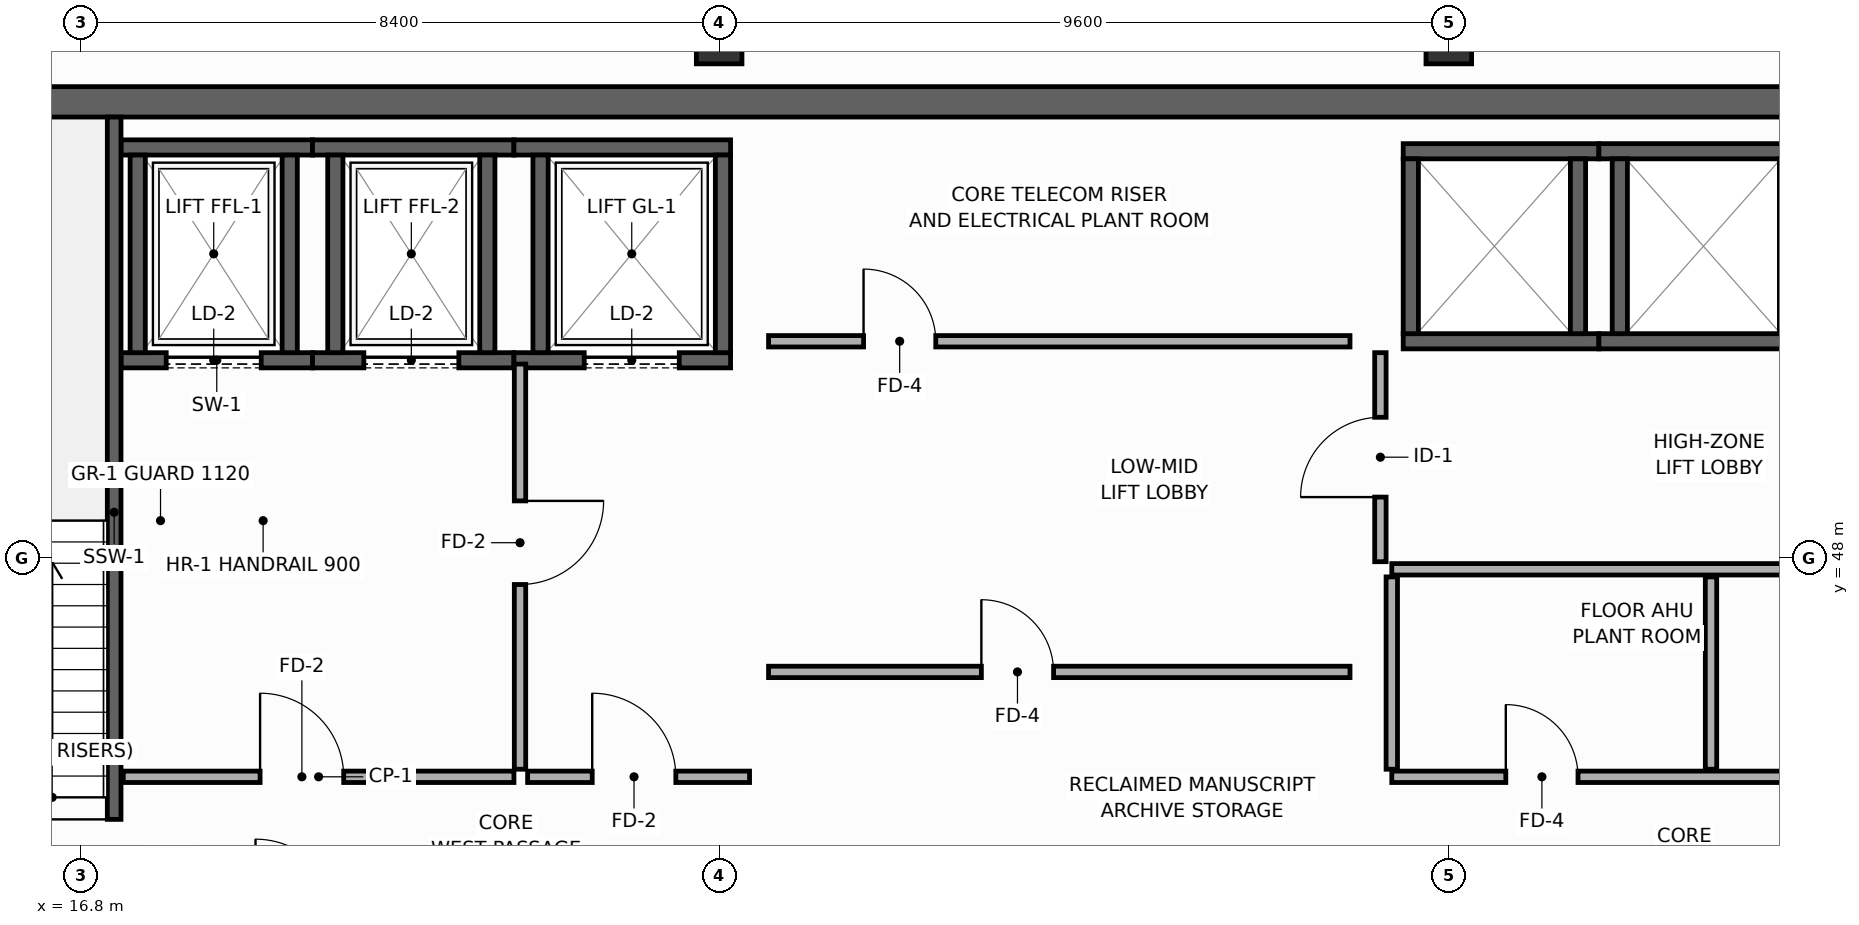
"""IFC4 building model, lengths in metres.
Left out: names, types, materials, properties, quantities, classifications, styles, units other than length and angle.
Written with IfcOpenShell. Run it as: python <this file> out.ifc"""

import sys

from ifc_helpers import new_model, si_unit, direction, frame, frame_2d, origin, origin_2d, place, context, subcontext, project, spatial, rectangle, hollow_rectangle, extrude, element, fill, save


model = new_model("IFC4")
c1 = context("Model", 3, precision=1e-05, world=origin(), true_north=direction((0.0, 1.0)))
c2 = subcontext(c1, "Body", "Model", "MODEL_VIEW")
j1 = project(units=[si_unit("LENGTHUNIT", "METRE"), si_unit("PLANEANGLEUNIT", "RADIAN")], contexts=[c1])
p1 = place(None, origin())
s1 = spatial("IfcSite", under=j1, at=p1, CompositionType="ELEMENT")
p2 = place(p1, origin())
s2 = spatial("IfcBuilding", under=s1, at=p2, CompositionType="ELEMENT")
p3 = place(p2, frame((0.0, 0.0, 314.2)))
s3 = spatial("IfcBuildingStorey", under=s2, at=p3, CompositionType="ELEMENT", Elevation=314.2)
p4 = place(p3, frame((13.7, 54.0, 0.0), z_axis=(0.0, 0.0, 1.0), x_axis=(1.0, 0.0, 0.0)))
e1 = element("IfcWall", 1, at=p4, inside=s3, PredefinedType="SHEAR", context=c2, shape_type="SweptSolid", body=[
    extrude(rectangle(XDim=32.5, YDim=0.4, at=frame_2d((16.25, 0.0))), origin(), (0.0, 0.0, 1.0), 4.75),
])
for number, where, z_axis, x_axis in (
    (2, (25.2, 54.8, 0.0), (0.0, 0.0, 1.0), (1.0, 0.0, 0.0)),
    (3, (34.8, 54.8, 0.0), (0.0, 0.0, 1.0), (1.0, 0.0, 0.0)),
):
    element("IfcColumn", number, at=place(p3, frame(where, z_axis=z_axis, x_axis=x_axis)), inside=s3, PredefinedType="COLUMN", context=c2, shape_type="SweptSolid", body=[
        extrude(hollow_rectangle(XDim=0.6, YDim=0.6, WallThickness=0.028, at=origin_2d()), origin(), (0.0, 0.0, 1.0), 5.0),
    ])
p5 = place(p3, frame((17.33, 50.6, 0.0), z_axis=(0.0, 0.0, 1.0), x_axis=(1.0, 0.0, 0.0)))
e4 = element("IfcWall", 4, at=p5, inside=s3, PredefinedType="SHEAR", context=c2, shape_type="SweptSolid", body=[
    extrude(rectangle(XDim=2.52, YDim=0.2, at=frame_2d((1.26, 0.0))), origin(), (0.0, 0.0, 1.0), 4.75),
])
p6 = place(p5, frame((0.595, 0.0, 0.0)))
e5 = element("IfcOpeningElement", 5, at=p6, cuts=e4, PredefinedType="OPENING", context=c2, shape_type="SweptSolid", body=[
    extrude(rectangle(XDim=1.25, YDim=2.3, at=frame_2d((0.625, 1.15))), frame((0.0, 0.11, 0.0), z_axis=(0.0, -1.0, 0.0), x_axis=(1.0, 0.0, 0.0)), (0.0, 0.0, 1.0), 0.22),
])
p7 = place(p3, frame((17.33, 53.4, 0.0), z_axis=(0.0, 0.0, 1.0), x_axis=(1.0, 0.0, 0.0)))
e6 = element("IfcWall", 6, at=p7, inside=s3, PredefinedType="SHEAR", context=c2, shape_type="SweptSolid", body=[
    extrude(rectangle(XDim=2.52, YDim=0.2, at=frame_2d((1.26, 0.0))), origin(), (0.0, 0.0, 1.0), 4.75),
])
for number, where, z_axis, x_axis in (
    (7, (17.55, 50.7, 0.0), (0.0, 0.0, 1.0), (0.0, 1.0, 0.0)),
    (8, (19.55, 50.7, 0.0), (0.0, 0.0, 1.0), (0.0, 1.0, 0.0)),
):
    element("IfcWall", number, at=place(p3, frame(where, z_axis=z_axis, x_axis=x_axis)), inside=s3, PredefinedType="SHEAR", context=c2, shape_type="SweptSolid", body=[
        extrude(rectangle(XDim=2.6, YDim=0.2, at=frame_2d((1.3, 0.0))), origin(), (0.0, 0.0, 1.0), 4.75),
    ])
p8 = place(p3, frame((19.85, 50.6, 0.0), z_axis=(0.0, 0.0, 1.0), x_axis=(1.0, 0.0, 0.0)))
e9 = element("IfcWall", 9, at=p8, inside=s3, PredefinedType="SHEAR", context=c2, shape_type="SweptSolid", body=[
    extrude(rectangle(XDim=2.65, YDim=0.2, at=frame_2d((1.325, 0.0))), origin(), (0.0, 0.0, 1.0), 4.75),
])
p9 = place(p8, frame((0.675, 0.0, 0.0)))
e10 = element("IfcOpeningElement", 10, at=p9, cuts=e9, PredefinedType="OPENING", context=c2, shape_type="SweptSolid", body=[
    extrude(rectangle(XDim=1.25, YDim=2.3, at=frame_2d((0.625, 1.15))), frame((0.0, 0.11, 0.0), z_axis=(0.0, -1.0, 0.0), x_axis=(1.0, 0.0, 0.0)), (0.0, 0.0, 1.0), 0.22),
])
p10 = place(p3, frame((19.85, 53.4, 0.0), z_axis=(0.0, 0.0, 1.0), x_axis=(1.0, 0.0, 0.0)))
e11 = element("IfcWall", 11, at=p10, inside=s3, PredefinedType="SHEAR", context=c2, shape_type="SweptSolid", body=[
    extrude(rectangle(XDim=2.65, YDim=0.2, at=frame_2d((1.325, 0.0))), origin(), (0.0, 0.0, 1.0), 4.75),
])
for number, where, z_axis, x_axis in (
    (12, (20.15, 50.7, 0.0), (0.0, 0.0, 1.0), (0.0, 1.0, 0.0)),
    (13, (22.15, 50.7, 0.0), (0.0, 0.0, 1.0), (0.0, 1.0, 0.0)),
):
    element("IfcWall", number, at=place(p3, frame(where, z_axis=z_axis, x_axis=x_axis)), inside=s3, PredefinedType="SHEAR", context=c2, shape_type="SweptSolid", body=[
        extrude(rectangle(XDim=2.6, YDim=0.2, at=frame_2d((1.3, 0.0))), origin(), (0.0, 0.0, 1.0), 4.75),
    ])
p11 = place(p3, frame((22.5, 50.6, 0.0), z_axis=(0.0, 0.0, 1.0), x_axis=(1.0, 0.0, 0.0)))
e14 = element("IfcWall", 14, at=p11, inside=s3, PredefinedType="SHEAR", context=c2, shape_type="SweptSolid", body=[
    extrude(rectangle(XDim=2.85, YDim=0.2, at=frame_2d((1.425, 0.0))), origin(), (0.0, 0.0, 1.0), 4.75),
])
p12 = place(p11, frame((0.925, 0.0, 0.0)))
e15 = element("IfcOpeningElement", 15, at=p12, cuts=e14, PredefinedType="OPENING", context=c2, shape_type="SweptSolid", body=[
    extrude(rectangle(XDim=1.25, YDim=2.3, at=frame_2d((0.625, 1.15))), frame((0.0, 0.11, 0.0), z_axis=(0.0, -1.0, 0.0), x_axis=(1.0, 0.0, 0.0)), (0.0, 0.0, 1.0), 0.22),
])
p13 = place(p3, frame((22.5, 53.4, 0.0), z_axis=(0.0, 0.0, 1.0), x_axis=(1.0, 0.0, 0.0)))
e16 = element("IfcWall", 16, at=p13, inside=s3, PredefinedType="SHEAR", context=c2, shape_type="SweptSolid", body=[
    extrude(rectangle(XDim=2.85, YDim=0.2, at=frame_2d((1.425, 0.0))), origin(), (0.0, 0.0, 1.0), 4.75),
])
for number, where, z_axis, x_axis in (
    (17, (22.85, 50.7, 0.0), (0.0, 0.0, 1.0), (0.0, 1.0, 0.0)),
    (18, (25.25, 50.7, 0.0), (0.0, 0.0, 1.0), (0.0, 1.0, 0.0)),
):
    element("IfcWall", number, at=place(p3, frame(where, z_axis=z_axis, x_axis=x_axis)), inside=s3, PredefinedType="SHEAR", context=c2, shape_type="SweptSolid", body=[
        extrude(rectangle(XDim=2.6, YDim=0.2, at=frame_2d((1.3, 0.0))), origin(), (0.0, 0.0, 1.0), 4.75),
    ])
for number, where, z_axis, x_axis in (
    (19, (34.2, 50.85, 0.0), (0.0, 0.0, 1.0), (1.0, 0.0, 0.0)),
    (20, (34.2, 53.35, 0.0), (0.0, 0.0, 1.0), (1.0, 0.0, 0.0)),
):
    element("IfcWall", number, at=place(p3, frame(where, z_axis=z_axis, x_axis=x_axis)), inside=s3, PredefinedType="SHEAR", context=c2, shape_type="SweptSolid", body=[
        extrude(rectangle(XDim=2.575, YDim=0.2, at=frame_2d((1.288, 0.0))), origin(), (0.0, 0.0, 1.0), 4.75),
    ])
for number, where, z_axis, x_axis in (
    (21, (34.3, 50.95, 0.0), (0.0, 0.0, 1.0), (0.0, 1.0, 0.0)),
    (22, (36.5, 50.95, 0.0), (0.0, 0.0, 1.0), (0.0, 1.0, 0.0)),
):
    element("IfcWall", number, at=place(p3, frame(where, z_axis=z_axis, x_axis=x_axis)), inside=s3, PredefinedType="SHEAR", context=c2, shape_type="SweptSolid", body=[
        extrude(rectangle(XDim=2.3, YDim=0.2, at=frame_2d((1.15, 0.0))), origin(), (0.0, 0.0, 1.0), 4.75),
    ])
for number, where, z_axis, x_axis in (
    (23, (36.775, 50.85, 0.0), (0.0, 0.0, 1.0), (1.0, 0.0, 0.0)),
    (24, (36.775, 53.35, 0.0), (0.0, 0.0, 1.0), (1.0, 0.0, 0.0)),
):
    element("IfcWall", number, at=place(p3, frame(where, z_axis=z_axis, x_axis=x_axis)), inside=s3, PredefinedType="SHEAR", context=c2, shape_type="SweptSolid", body=[
        extrude(rectangle(XDim=2.75, YDim=0.2, at=frame_2d((1.375, 0.0))), origin(), (0.0, 0.0, 1.0), 4.75),
    ])
p14 = place(p3, frame((37.05, 50.95, 0.0), z_axis=(0.0, 0.0, 1.0), x_axis=(0.0, 1.0, 0.0)))
e25 = element("IfcWall", 25, at=p14, inside=s3, PredefinedType="SHEAR", context=c2, shape_type="SweptSolid", body=[
    extrude(rectangle(XDim=2.3, YDim=0.2, at=frame_2d((1.15, 0.0))), origin(), (0.0, 0.0, 1.0), 4.75),
])
p15 = place(p3, frame((17.24, 43.4, 0.0), z_axis=(0.0, 0.0, 1.0), x_axis=(0.0, 1.0, 0.0)))
e26 = element("IfcWall", 26, at=p15, inside=s3, PredefinedType="SHEAR", context=c2, shape_type="SweptSolid", body=[
    extrude(rectangle(XDim=10.4, YDim=0.18, at=frame_2d((5.2, 0.0))), origin(), (0.0, 0.0, 1.0), 4.75),
])
p16 = place(p15, frame((0.16, 0.0, 0.0)))
e27 = element("IfcOpeningElement", 27, at=p16, cuts=e26, PredefinedType="OPENING", context=c2, shape_type="SweptSolid", body=[
    extrude(rectangle(XDim=1.0, YDim=2.15, at=frame_2d((0.5, 1.075))), frame((0.0, 0.1, 0.0), z_axis=(0.0, -1.0, 0.0), x_axis=(1.0, 0.0, 0.0)), (0.0, 0.0, 1.0), 0.2),
])
p17 = place(p3, frame((17.36, 45.12, 0.0), z_axis=(0.0, 0.0, 1.0), x_axis=(1.0, 0.0, 0.0)))
e28 = element("IfcWall", 28, at=p17, inside=s3, PredefinedType="PARTITIONING", context=c2, shape_type="SweptSolid", body=[
    extrude(rectangle(XDim=5.14, YDim=0.15, at=frame_2d((2.57, 0.0))), origin(), (0.0, 0.0, 1.0), 4.75),
])
p18 = place(p17, frame((1.8, 0.0, 0.0)))
e29 = element("IfcOpeningElement", 29, at=p18, cuts=e28, PredefinedType="OPENING", context=c2, shape_type="SweptSolid", body=[
    extrude(rectangle(XDim=1.1, YDim=2.15, at=frame_2d((0.55, 1.075))), frame((0.0, 0.085, 0.0), z_axis=(0.0, -1.0, 0.0), x_axis=(1.0, 0.0, 0.0)), (0.0, 0.0, 1.0), 0.17),
])
p19 = place(p3, frame((22.58, 50.55, 0.0), z_axis=(0.0, 0.0, 1.0), x_axis=(0.0, -1.0, 0.0)))
e30 = element("IfcWall", 30, at=p19, inside=s3, PredefinedType="PARTITIONING", context=c2, shape_type="SweptSolid", body=[
    extrude(rectangle(XDim=5.33, YDim=0.15, at=frame_2d((2.665, 0.0))), origin(), (0.0, 0.0, 1.0), 4.75),
])
p20 = place(p19, frame((1.8, 0.0, 0.0)))
e31 = element("IfcOpeningElement", 31, at=p20, cuts=e30, PredefinedType="OPENING", context=c2, shape_type="SweptSolid", body=[
    extrude(rectangle(XDim=1.1, YDim=2.15, at=frame_2d((0.55, 1.075))), frame((0.0, 0.085, 0.0), z_axis=(0.0, -1.0, 0.0), x_axis=(1.0, 0.0, 0.0)), (0.0, 0.0, 1.0), 0.17),
])
p21 = place(p3, frame((22.68, 45.12, 0.0), z_axis=(0.0, 0.0, 1.0), x_axis=(1.0, 0.0, 0.0)))
e32 = element("IfcWall", 32, at=p21, inside=s3, PredefinedType="PARTITIONING", context=c2, shape_type="SweptSolid", body=[
    extrude(rectangle(XDim=2.92, YDim=0.15, at=frame_2d((1.46, 0.0))), origin(), (0.0, 0.0, 1.0), 4.75),
])
p22 = place(p21, frame((0.85, 0.0, 0.0)))
e33 = element("IfcOpeningElement", 33, at=p22, cuts=e32, PredefinedType="OPENING", context=c2, shape_type="SweptSolid", body=[
    extrude(rectangle(XDim=1.1, YDim=2.15, at=frame_2d((0.55, 1.075))), frame((0.0, 0.085, 0.0), z_axis=(0.0, -1.0, 0.0), x_axis=(1.0, 0.0, 0.0)), (0.0, 0.0, 1.0), 0.17),
])
p23 = place(p3, frame((33.9, 47.95, 0.0), z_axis=(0.0, 0.0, 1.0), x_axis=(0.0, 1.0, 0.0)))
e34 = element("IfcWall", 34, at=p23, inside=s3, PredefinedType="PARTITIONING", context=c2, shape_type="SweptSolid", body=[
    extrude(rectangle(XDim=2.75, YDim=0.15, at=frame_2d((1.375, 0.0))), origin(), (0.0, 0.0, 1.0), 4.75),
])
p24 = place(p23, frame((0.85, 0.0, 0.0)))
e35 = element("IfcOpeningElement", 35, at=p24, cuts=e34, PredefinedType="OPENING", context=c2, shape_type="SweptSolid", body=[
    extrude(rectangle(XDim=1.05, YDim=2.15, at=frame_2d((0.525, 1.075))), frame((0.0, 0.085, 0.0), z_axis=(0.0, -1.0, 0.0), x_axis=(1.0, 0.0, 0.0)), (0.0, 0.0, 1.0), 0.17),
])
p25 = place(p3, frame((34.05, 45.12, 0.0), z_axis=(0.0, 0.0, 1.0), x_axis=(1.0, 0.0, 0.0)))
e36 = element("IfcWall", 36, at=p25, inside=s3, PredefinedType="PARTITIONING", context=c2, shape_type="SweptSolid", body=[
    extrude(rectangle(XDim=8.45, YDim=0.15, at=frame_2d((4.225, 0.0))), origin(), (0.0, 0.0, 1.0), 4.75),
])
p26 = place(p25, frame((1.5, 0.0, 0.0)))
e37 = element("IfcOpeningElement", 37, at=p26, cuts=e36, PredefinedType="OPENING", context=c2, shape_type="SweptSolid", body=[
    extrude(rectangle(XDim=0.95, YDim=2.15, at=frame_2d((0.475, 1.075))), frame((0.0, 0.085, 0.0), z_axis=(0.0, -1.0, 0.0), x_axis=(1.0, 0.0, 0.0)), (0.0, 0.0, 1.0), 0.17),
])
p27 = place(p25, frame((5.8, 0.0, 0.0)))
e38 = element("IfcOpeningElement", 38, at=p27, cuts=e36, PredefinedType="OPENING", context=c2, shape_type="SweptSolid", body=[
    extrude(rectangle(XDim=0.95, YDim=2.15, at=frame_2d((0.475, 1.075))), frame((0.0, 0.085, 0.0), z_axis=(0.0, -1.0, 0.0), x_axis=(1.0, 0.0, 0.0)), (0.0, 0.0, 1.0), 0.17),
])
p28 = place(p3, frame((34.05, 47.85, 0.0), z_axis=(0.0, 0.0, 1.0), x_axis=(1.0, 0.0, 0.0)))
e39 = element("IfcWall", 39, at=p28, inside=s3, PredefinedType="PARTITIONING", context=c2, shape_type="SweptSolid", body=[
    extrude(rectangle(XDim=8.45, YDim=0.15, at=frame_2d((4.225, 0.0))), origin(), (0.0, 0.0, 1.0), 4.75),
])
for number, where, z_axis, x_axis in (
    (40, (38.25, 45.22, 0.0), (0.0, 0.0, 1.0), (0.0, 1.0, 0.0)),
    (41, (34.05, 45.22, 0.0), (0.0, 0.0, 1.0), (0.0, 1.0, 0.0)),
):
    element("IfcWall", number, at=place(p3, frame(where, z_axis=z_axis, x_axis=x_axis)), inside=s3, PredefinedType="PARTITIONING", context=c2, shape_type="SweptSolid", body=[
        extrude(rectangle(XDim=2.53, YDim=0.15, at=frame_2d((1.265, 0.0))), origin(), (0.0, 0.0, 1.0), 4.75),
    ])
p29 = place(p3, frame((25.85, 50.85, 0.0), z_axis=(0.0, 0.0, 1.0), x_axis=(1.0, 0.0, 0.0)))
e42 = element("IfcWall", 42, at=p29, inside=s3, PredefinedType="PARTITIONING", context=c2, shape_type="SweptSolid", body=[
    extrude(rectangle(XDim=7.65, YDim=0.15, at=frame_2d((3.825, 0.0))), origin(), (0.0, 0.0, 1.0), 4.75),
])
p30 = place(p29, frame((1.25, 0.0, 0.0)))
e43 = element("IfcOpeningElement", 43, at=p30, cuts=e42, PredefinedType="OPENING", context=c2, shape_type="SweptSolid", body=[
    extrude(rectangle(XDim=0.95, YDim=2.15, at=frame_2d((0.475, 1.075))), frame((0.0, 0.085, 0.0), z_axis=(0.0, -1.0, 0.0), x_axis=(1.0, 0.0, 0.0)), (0.0, 0.0, 1.0), 0.17),
])
p31 = place(p3, frame((25.85, 46.5, 0.0), z_axis=(0.0, 0.0, 1.0), x_axis=(1.0, 0.0, 0.0)))
e44 = element("IfcWall", 44, at=p31, inside=s3, PredefinedType="PARTITIONING", context=c2, shape_type="SweptSolid", body=[
    extrude(rectangle(XDim=7.65, YDim=0.15, at=frame_2d((3.825, 0.0))), origin(), (0.0, 0.0, 1.0), 4.75),
])
p32 = place(p31, frame((2.8, 0.0, 0.0)))
e45 = element("IfcOpeningElement", 45, at=p32, cuts=e44, PredefinedType="OPENING", context=c2, shape_type="SweptSolid", body=[
    extrude(rectangle(XDim=0.95, YDim=2.15, at=frame_2d((0.475, 1.075))), frame((0.0, 0.085, 0.0), z_axis=(0.0, -1.0, 0.0), x_axis=(1.0, 0.0, 0.0)), (0.0, 0.0, 1.0), 0.17),
])
p33 = place(p6, origin())
e46 = element("IfcDoor", 46, at=p33, inside=s3, OperationType="SLIDING_TO_LEFT", PredefinedType="DOOR", context=c2, shape_type="SweptSolid", body=[
    extrude(rectangle(XDim=1.25, YDim=2.3, at=frame_2d((0.625, 1.15))), frame((0.0, 0.025, 0.0), z_axis=(0.0, -1.0, 0.0), x_axis=(1.0, 0.0, 0.0)), (0.0, 0.0, 1.0), 0.05),
])
fill(e5, e46)
p34 = place(p9, origin())
e47 = element("IfcDoor", 47, at=p34, inside=s3, OperationType="SLIDING_TO_LEFT", PredefinedType="DOOR", context=c2, shape_type="SweptSolid", body=[
    extrude(rectangle(XDim=1.25, YDim=2.3, at=frame_2d((0.625, 1.15))), frame((0.0, 0.025, 0.0), z_axis=(0.0, -1.0, 0.0), x_axis=(1.0, 0.0, 0.0)), (0.0, 0.0, 1.0), 0.05),
])
fill(e10, e47)
p35 = place(p12, origin())
e48 = element("IfcDoor", 48, at=p35, inside=s3, OperationType="SLIDING_TO_LEFT", PredefinedType="DOOR", context=c2, shape_type="SweptSolid", body=[
    extrude(rectangle(XDim=1.25, YDim=2.3, at=frame_2d((0.625, 1.15))), frame((0.0, 0.025, 0.0), z_axis=(0.0, -1.0, 0.0), x_axis=(1.0, 0.0, 0.0)), (0.0, 0.0, 1.0), 0.05),
])
fill(e15, e48)
p36 = place(p16, origin())
e49 = element("IfcDoor", 49, at=p36, inside=s3, OperationType="SINGLE_SWING_RIGHT", PredefinedType="DOOR", context=c2, shape_type="SweptSolid", body=[
    extrude(rectangle(XDim=1.0, YDim=2.15, at=frame_2d((0.5, 1.075))), frame((0.0, 0.025, 0.0), z_axis=(0.0, -1.0, 0.0), x_axis=(1.0, 0.0, 0.0)), (0.0, 0.0, 1.0), 0.05),
])
fill(e27, e49)
p37 = place(p18, origin())
e50 = element("IfcDoor", 50, at=p37, inside=s3, OperationType="SINGLE_SWING_LEFT", PredefinedType="DOOR", context=c2, shape_type="SweptSolid", body=[
    extrude(rectangle(XDim=1.1, YDim=2.15, at=frame_2d((0.55, 1.075))), frame((0.0, 0.025, 0.0), z_axis=(0.0, -1.0, 0.0), x_axis=(1.0, 0.0, 0.0)), (0.0, 0.0, 1.0), 0.05),
])
fill(e29, e50)
p38 = place(p20, origin())
e51 = element("IfcDoor", 51, at=p38, inside=s3, OperationType="SINGLE_SWING_LEFT", PredefinedType="DOOR", context=c2, shape_type="SweptSolid", body=[
    extrude(rectangle(XDim=1.1, YDim=2.15, at=frame_2d((0.55, 1.075))), frame((0.0, 0.025, 0.0), z_axis=(0.0, -1.0, 0.0), x_axis=(1.0, 0.0, 0.0)), (0.0, 0.0, 1.0), 0.05),
])
fill(e31, e51)
p39 = place(p22, origin())
e52 = element("IfcDoor", 52, at=p39, inside=s3, OperationType="SINGLE_SWING_LEFT", PredefinedType="DOOR", context=c2, shape_type="SweptSolid", body=[
    extrude(rectangle(XDim=1.1, YDim=2.15, at=frame_2d((0.55, 1.075))), frame((0.0, 0.025, 0.0), z_axis=(0.0, -1.0, 0.0), x_axis=(1.0, 0.0, 0.0)), (0.0, 0.0, 1.0), 0.05),
])
fill(e33, e52)
p40 = place(p24, origin())
e53 = element("IfcDoor", 53, at=p40, inside=s3, OperationType="SINGLE_SWING_LEFT", PredefinedType="DOOR", context=c2, shape_type="SweptSolid", body=[
    extrude(rectangle(XDim=1.05, YDim=2.15, at=frame_2d((0.525, 1.075))), frame((0.0, 0.025, 0.0), z_axis=(0.0, -1.0, 0.0), x_axis=(1.0, 0.0, 0.0)), (0.0, 0.0, 1.0), 0.05),
])
fill(e35, e53)
p41 = place(p26, origin())
e54 = element("IfcDoor", 54, at=p41, inside=s3, OperationType="SINGLE_SWING_LEFT", PredefinedType="DOOR", context=c2, shape_type="SweptSolid", body=[
    extrude(rectangle(XDim=0.95, YDim=2.15, at=frame_2d((0.475, 1.075))), frame((0.0, 0.025, 0.0), z_axis=(0.0, -1.0, 0.0), x_axis=(1.0, 0.0, 0.0)), (0.0, 0.0, 1.0), 0.05),
])
fill(e37, e54)
p42 = place(p30, origin())
e55 = element("IfcDoor", 55, at=p42, inside=s3, OperationType="SINGLE_SWING_LEFT", PredefinedType="DOOR", context=c2, shape_type="SweptSolid", body=[
    extrude(rectangle(XDim=0.95, YDim=2.15, at=frame_2d((0.475, 1.075))), frame((0.0, 0.025, 0.0), z_axis=(0.0, -1.0, 0.0), x_axis=(1.0, 0.0, 0.0)), (0.0, 0.0, 1.0), 0.05),
])
fill(e43, e55)
p43 = place(p32, origin())
e56 = element("IfcDoor", 56, at=p43, inside=s3, OperationType="SINGLE_SWING_LEFT", PredefinedType="DOOR", context=c2, shape_type="SweptSolid", body=[
    extrude(rectangle(XDim=0.95, YDim=2.15, at=frame_2d((0.475, 1.075))), frame((0.0, 0.025, 0.0), z_axis=(0.0, -1.0, 0.0), x_axis=(1.0, 0.0, 0.0)), (0.0, 0.0, 1.0), 0.05),
])
fill(e45, e56)
save(model, sys.argv[1])
